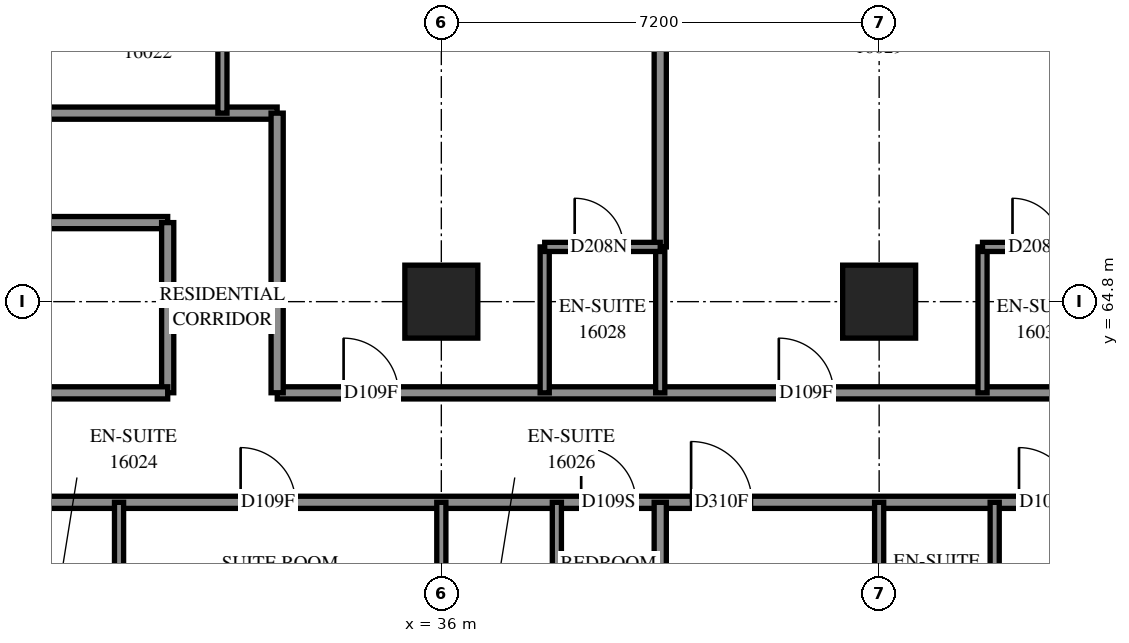
"""IFC4 building model, lengths in metres.
Left out: names, types, materials, properties, quantities, classifications, styles, units other than length and angle.
Written with IfcOpenShell. Run it as: python <this file> out.ifc"""

import sys

from ifc_helpers import new_model, si_unit, direction, frame, frame_2d, origin, origin_2d, place, context, subcontext, project, spatial, rectangle, extrude, element, fill, save


model = new_model("IFC4")
c1 = context("Model", 3, precision=1e-05, world=origin(), true_north=direction((0.0, 1.0)))
c2 = subcontext(c1, "Body", "Model", "MODEL_VIEW")
j1 = project(units=[si_unit("LENGTHUNIT", "METRE"), si_unit("PLANEANGLEUNIT", "RADIAN")], contexts=[c1])
p1 = place(None, origin())
s1 = spatial("IfcSite", under=j1, at=p1, CompositionType="ELEMENT")
p2 = place(p1, origin())
s2 = spatial("IfcBuilding", under=s1, at=p2, CompositionType="ELEMENT")
p3 = place(p2, frame((0.0, 0.0, 61.0)))
s3 = spatial("IfcBuildingStorey", under=s2, at=p3, CompositionType="ELEMENT", Elevation=61.0)
for number, where, z_axis, x_axis in (
    (1, (36.0, 64.8, 0.0), (0.0, 0.0, 1.0), (1.0, 0.0, 0.0)),
    (2, (43.2, 64.8, 0.0), (0.0, 0.0, 1.0), (1.0, 0.0, 0.0)),
):
    element("IfcColumn", number, at=place(p3, frame(where, z_axis=z_axis, x_axis=x_axis)), inside=s3, PredefinedType="COLUMN", context=c2, shape_type="SweptSolid", body=[
        extrude(rectangle(XDim=1.2, YDim=1.2, at=origin_2d()), origin(), (0.0, 0.0, 1.0), 3.1),
    ])
p4 = place(p3, frame((28.8, 61.5, 0.0), z_axis=(0.0, 0.0, 1.0), x_axis=(1.0, 0.0, 0.0)))
e3 = element("IfcWall", 3, at=p4, inside=s3, PredefinedType="PARTITIONING", context=c2, shape_type="SweptSolid", body=[
    extrude(rectangle(XDim=24.3, YDim=0.2, at=frame_2d((12.15, 0.0))), origin(), (0.0, 0.0, 1.0), 3.1),
])
p5 = place(p4, frame((3.899, 0.0, 0.0)))
e4 = element("IfcOpeningElement", 4, at=p5, cuts=e3, PredefinedType="OPENING", context=c2, shape_type="SweptSolid", body=[
    extrude(rectangle(XDim=0.9, YDim=2.1, at=frame_2d((0.45, 1.05))), frame((0.0, 0.11, 0.0), z_axis=(0.0, -1.0, 0.0), x_axis=(1.0, 0.0, 0.0)), (0.0, 0.0, 1.0), 0.22),
])
p6 = place(p4, frame((9.5, 0.0, 0.0)))
e5 = element("IfcOpeningElement", 5, at=p6, cuts=e3, PredefinedType="OPENING", context=c2, shape_type="SweptSolid", body=[
    extrude(rectangle(XDim=0.9, YDim=2.1, at=frame_2d((0.45, 1.05))), frame((0.0, 0.11, 0.0), z_axis=(0.0, -1.0, 0.0), x_axis=(1.0, 0.0, 0.0)), (0.0, 0.0, 1.0), 0.22),
])
p7 = place(p4, frame((11.307, 0.0, 0.0)))
e6 = element("IfcOpeningElement", 6, at=p7, cuts=e3, PredefinedType="OPENING", context=c2, shape_type="SweptSolid", body=[
    extrude(rectangle(XDim=1.0, YDim=2.1, at=frame_2d((0.5, 1.05))), frame((0.0, 0.11, 0.0), z_axis=(0.0, -1.0, 0.0), x_axis=(1.0, 0.0, 0.0)), (0.0, 0.0, 1.0), 0.22),
])
p8 = place(p4, frame((16.7, 0.0, 0.0)))
e7 = element("IfcOpeningElement", 7, at=p8, cuts=e3, PredefinedType="OPENING", context=c2, shape_type="SweptSolid", body=[
    extrude(rectangle(XDim=0.9, YDim=2.1, at=frame_2d((0.45, 1.05))), frame((0.0, 0.11, 0.0), z_axis=(0.0, -1.0, 0.0), x_axis=(1.0, 0.0, 0.0)), (0.0, 0.0, 1.0), 0.22),
])
p9 = place(p4, frame((18.508, 0.0, 0.0)))
e8 = element("IfcOpeningElement", 8, at=p9, cuts=e3, PredefinedType="OPENING", context=c2, shape_type="SweptSolid", body=[
    extrude(rectangle(XDim=1.0, YDim=2.1, at=frame_2d((0.5, 1.05))), frame((0.0, 0.11, 0.0), z_axis=(0.0, -1.0, 0.0), x_axis=(1.0, 0.0, 0.0)), (0.0, 0.0, 1.0), 0.22),
])
p10 = place(p4, frame((23.033, 0.0, 0.0)))
e9 = element("IfcOpeningElement", 9, at=p10, cuts=e3, PredefinedType="OPENING", context=c2, shape_type="SweptSolid", body=[
    extrude(rectangle(XDim=1.0, YDim=2.1, at=frame_2d((0.5, 1.05))), frame((0.0, 0.11, 0.0), z_axis=(0.0, -1.0, 0.0), x_axis=(1.0, 0.0, 0.0)), (0.0, 0.0, 1.0), 0.22),
])
p11 = place(p3, frame((33.302, 63.3, 0.0), z_axis=(0.0, 0.0, 1.0), x_axis=(1.0, 0.0, 0.0)))
e10 = element("IfcWall", 10, at=p11, inside=s3, PredefinedType="PARTITIONING", context=c2, shape_type="SweptSolid", body=[
    extrude(rectangle(XDim=21.798, YDim=0.2, at=frame_2d((10.899, 0.0))), origin(), (0.0, 0.0, 1.0), 3.1),
])
p12 = place(p11, frame((1.091, 0.0, 0.0)))
e11 = element("IfcOpeningElement", 11, at=p12, cuts=e10, PredefinedType="OPENING", context=c2, shape_type="SweptSolid", body=[
    extrude(rectangle(XDim=0.9, YDim=2.1, at=frame_2d((0.45, 1.05))), frame((0.0, 0.11, 0.0), z_axis=(0.0, -1.0, 0.0), x_axis=(1.0, 0.0, 0.0)), (0.0, 0.0, 1.0), 0.22),
])
p13 = place(p11, frame((8.248, 0.0, 0.0)))
e12 = element("IfcOpeningElement", 12, at=p13, cuts=e10, PredefinedType="OPENING", context=c2, shape_type="SweptSolid", body=[
    extrude(rectangle(XDim=0.9, YDim=2.1, at=frame_2d((0.45, 1.05))), frame((0.0, 0.11, 0.0), z_axis=(0.0, -1.0, 0.0), x_axis=(1.0, 0.0, 0.0)), (0.0, 0.0, 1.0), 0.22),
])
p14 = place(p11, frame((15.448, 0.0, 0.0)))
e13 = element("IfcOpeningElement", 13, at=p14, cuts=e10, PredefinedType="OPENING", context=c2, shape_type="SweptSolid", body=[
    extrude(rectangle(XDim=0.9, YDim=2.1, at=frame_2d((0.45, 1.05))), frame((0.0, 0.11, 0.0), z_axis=(0.0, -1.0, 0.0), x_axis=(1.0, 0.0, 0.0)), (0.0, 0.0, 1.0), 0.22),
])
p15 = place(p3, frame((21.602, 67.9, 0.0), z_axis=(0.0, 0.0, 1.0), x_axis=(1.0, 0.0, 0.0)))
e14 = element("IfcWall", 14, at=p15, inside=s3, PredefinedType="PARTITIONING", context=c2, shape_type="SweptSolid", body=[
    extrude(rectangle(XDim=11.698, YDim=0.2, at=frame_2d((5.849, 0.0))), origin(), (0.0, 0.0, 1.0), 3.1),
])
p16 = place(p15, frame((5.955, 0.0, 0.0)))
e15 = element("IfcOpeningElement", 15, at=p16, cuts=e14, PredefinedType="OPENING", context=c2, shape_type="SweptSolid", body=[
    extrude(rectangle(XDim=0.9, YDim=2.1, at=frame_2d((0.45, 1.05))), frame((0.0, 0.11, 0.0), z_axis=(0.0, -1.0, 0.0), x_axis=(1.0, 0.0, 0.0)), (0.0, 0.0, 1.0), 0.22),
])
p17 = place(p3, frame((21.6, 66.1, 0.0), z_axis=(0.0, 0.0, 1.0), x_axis=(1.0, 0.0, 0.0)))
e16 = element("IfcWall", 16, at=p17, inside=s3, PredefinedType="PARTITIONING", context=c2, shape_type="SweptSolid", body=[
    extrude(rectangle(XDim=9.9, YDim=0.2, at=frame_2d((4.95, 0.0))), origin(), (0.0, 0.0, 1.0), 3.1),
])
p18 = place(p17, frame((5.314, 0.0, 0.0)))
e17 = element("IfcOpeningElement", 17, at=p18, cuts=e16, PredefinedType="OPENING", context=c2, shape_type="SweptSolid", body=[
    extrude(rectangle(XDim=1.0, YDim=2.1, at=frame_2d((0.5, 1.05))), frame((0.0, 0.11, 0.0), z_axis=(0.0, -1.0, 0.0), x_axis=(1.0, 0.0, 0.0)), (0.0, 0.0, 1.0), 0.22),
])
p19 = place(p3, frame((39.6, 65.7, 0.0), z_axis=(0.0, 0.0, 1.0), x_axis=(0.0, 1.0, 0.0)))
e18 = element("IfcWall", 18, at=p19, inside=s3, PredefinedType="PARTITIONING", context=c2, shape_type="SweptSolid", body=[
    extrude(rectangle(XDim=7.155, YDim=0.2, at=frame_2d((3.578, 0.0))), origin(), (0.0, 0.0, 1.0), 3.1),
])
p20 = place(p3, frame((39.6, 55.747, 0.0), z_axis=(0.0, 0.0, 1.0), x_axis=(0.0, 1.0, 0.0)))
e19 = element("IfcWall", 19, at=p20, inside=s3, PredefinedType="PARTITIONING", context=c2, shape_type="SweptSolid", body=[
    extrude(rectangle(XDim=5.753, YDim=0.2, at=frame_2d((2.877, 0.0))), origin(), (0.0, 0.0, 1.0), 3.1),
])
p21 = place(p3, frame((33.3, 63.302, 0.0), z_axis=(0.0, 0.0, 1.0), x_axis=(0.0, 1.0, 0.0)))
e20 = element("IfcWall", 20, at=p21, inside=s3, PredefinedType="PARTITIONING", context=c2, shape_type="SweptSolid", body=[
    extrude(rectangle(XDim=4.598, YDim=0.2, at=frame_2d((2.299, 0.0))), origin(), (0.0, 0.0, 1.0), 3.1),
])
p22 = place(p3, frame((31.5, 63.302, 0.0), z_axis=(0.0, 0.0, 1.0), x_axis=(0.0, 1.0, 0.0)))
e21 = element("IfcWall", 21, at=p22, inside=s3, PredefinedType="PARTITIONING", context=c2, shape_type="SweptSolid", body=[
    extrude(rectangle(XDim=2.798, YDim=0.2, at=frame_2d((1.399, 0.0))), origin(), (0.0, 0.0, 1.0), 3.1),
])
p23 = place(p3, frame((28.802, 63.3, 0.0), z_axis=(0.0, 0.0, 1.0), x_axis=(1.0, 0.0, 0.0)))
e22 = element("IfcWall", 22, at=p23, inside=s3, PredefinedType="PARTITIONING", context=c2, shape_type="SweptSolid", body=[
    extrude(rectangle(XDim=2.698, YDim=0.2, at=frame_2d((1.349, 0.0))), origin(), (0.0, 0.0, 1.0), 3.1),
])
for number, where, z_axis, x_axis in (
    (23, (37.7, 63.3, 0.0), (0.0, 0.0, 1.0), (0.0, 1.0, 0.0)),
    (24, (39.6, 63.3, 0.0), (0.0, 0.0, 1.0), (0.0, 1.0, 0.0)),
    (25, (44.9, 63.3, 0.0), (0.0, 0.0, 1.0), (0.0, 1.0, 0.0)),
    (26, (30.7, 59.1, 0.0), (0.0, 0.0, 1.0), (0.0, 1.0, 0.0)),
    (27, (37.9, 59.1, 0.0), (0.0, 0.0, 1.0), (0.0, 1.0, 0.0)),
    (28, (36.0, 59.1, 0.0), (0.0, 0.0, 1.0), (0.0, 1.0, 0.0)),
    (29, (45.1, 59.1, 0.0), (0.0, 0.0, 1.0), (0.0, 1.0, 0.0)),
    (30, (43.2, 59.1, 0.0), (0.0, 0.0, 1.0), (0.0, 1.0, 0.0)),
    (31, (32.4, 67.9, 0.0), (0.0, 0.0, 1.0), (0.0, 1.0, 0.0)),
):
    element("IfcWall", number, at=place(p3, frame(where, z_axis=z_axis, x_axis=x_axis)), inside=s3, PredefinedType="PARTITIONING", context=c2, shape_type="SweptSolid", body=[
        extrude(rectangle(XDim=2.4, YDim=0.15, at=frame_2d((1.2, 0.0))), origin(), (0.0, 0.0, 1.0), 3.1),
    ])
p24 = place(p3, frame((37.7, 65.7, 0.0), z_axis=(0.0, 0.0, 1.0), x_axis=(1.0, 0.0, 0.0)))
e32 = element("IfcWall", 32, at=p24, inside=s3, PredefinedType="PARTITIONING", context=c2, shape_type="SweptSolid", body=[
    extrude(rectangle(XDim=1.9, YDim=0.15, at=frame_2d((0.95, 0.0))), origin(), (0.0, 0.0, 1.0), 3.1),
])
p25 = place(p24, frame((0.493, 0.0, 0.0)))
e33 = element("IfcOpeningElement", 33, at=p25, cuts=e32, PredefinedType="OPENING", context=c2, shape_type="SweptSolid", body=[
    extrude(rectangle(XDim=0.8, YDim=2.1, at=frame_2d((0.4, 1.05))), frame((0.0, 0.085, 0.0), z_axis=(0.0, -1.0, 0.0), x_axis=(1.0, 0.0, 0.0)), (0.0, 0.0, 1.0), 0.17),
])
p26 = place(p3, frame((44.9, 65.7, 0.0), z_axis=(0.0, 0.0, 1.0), x_axis=(1.0, 0.0, 0.0)))
e34 = element("IfcWall", 34, at=p26, inside=s3, PredefinedType="PARTITIONING", context=c2, shape_type="SweptSolid", body=[
    extrude(rectangle(XDim=1.9, YDim=0.15, at=frame_2d((0.95, 0.0))), origin(), (0.0, 0.0, 1.0), 3.1),
])
p27 = place(p26, frame((0.493, 0.0, 0.0)))
e35 = element("IfcOpeningElement", 35, at=p27, cuts=e34, PredefinedType="OPENING", context=c2, shape_type="SweptSolid", body=[
    extrude(rectangle(XDim=0.8, YDim=2.1, at=frame_2d((0.4, 1.05))), frame((0.0, 0.085, 0.0), z_axis=(0.0, -1.0, 0.0), x_axis=(1.0, 0.0, 0.0)), (0.0, 0.0, 1.0), 0.17),
])
p28 = place(p5, origin())
e36 = element("IfcDoor", 36, at=p28, inside=s3, OperationType="SINGLE_SWING_LEFT", PredefinedType="DOOR", context=c2, shape_type="SweptSolid", body=[
    extrude(rectangle(XDim=0.9, YDim=2.1, at=frame_2d((0.45, 1.05))), frame((0.0, 0.025, 0.0), z_axis=(0.0, -1.0, 0.0), x_axis=(1.0, 0.0, 0.0)), (0.0, 0.0, 1.0), 0.05),
])
fill(e4, e36)
p29 = place(p6, origin())
e37 = element("IfcDoor", 37, at=p29, inside=s3, OperationType="SINGLE_SWING_LEFT", PredefinedType="DOOR", context=c2, shape_type="SweptSolid", body=[
    extrude(rectangle(XDim=0.9, YDim=2.1, at=frame_2d((0.45, 1.05))), frame((0.0, 0.025, 0.0), z_axis=(0.0, -1.0, 0.0), x_axis=(1.0, 0.0, 0.0)), (0.0, 0.0, 1.0), 0.05),
])
fill(e5, e37)
p30 = place(p12, origin())
e38 = element("IfcDoor", 38, at=p30, inside=s3, OperationType="SINGLE_SWING_LEFT", PredefinedType="DOOR", context=c2, shape_type="SweptSolid", body=[
    extrude(rectangle(XDim=0.9, YDim=2.1, at=frame_2d((0.45, 1.05))), frame((0.0, 0.025, 0.0), z_axis=(0.0, -1.0, 0.0), x_axis=(1.0, 0.0, 0.0)), (0.0, 0.0, 1.0), 0.05),
])
fill(e11, e38)
p31 = place(p25, origin())
e39 = element("IfcDoor", 39, at=p31, inside=s3, OperationType="SINGLE_SWING_RIGHT", PredefinedType="DOOR", context=c2, shape_type="SweptSolid", body=[
    extrude(rectangle(XDim=0.8, YDim=2.1, at=frame_2d((0.4, 1.05))), frame((0.0, 0.025, 0.0), z_axis=(0.0, -1.0, 0.0), x_axis=(1.0, 0.0, 0.0)), (0.0, 0.0, 1.0), 0.05),
])
fill(e33, e39)
p32 = place(p13, origin())
e40 = element("IfcDoor", 40, at=p32, inside=s3, OperationType="SINGLE_SWING_LEFT", PredefinedType="DOOR", context=c2, shape_type="SweptSolid", body=[
    extrude(rectangle(XDim=0.9, YDim=2.1, at=frame_2d((0.45, 1.05))), frame((0.0, 0.025, 0.0), z_axis=(0.0, -1.0, 0.0), x_axis=(1.0, 0.0, 0.0)), (0.0, 0.0, 1.0), 0.05),
])
fill(e12, e40)
p33 = place(p27, origin())
e41 = element("IfcDoor", 41, at=p33, inside=s3, OperationType="SINGLE_SWING_RIGHT", PredefinedType="DOOR", context=c2, shape_type="SweptSolid", body=[
    extrude(rectangle(XDim=0.8, YDim=2.1, at=frame_2d((0.4, 1.05))), frame((0.0, 0.025, 0.0), z_axis=(0.0, -1.0, 0.0), x_axis=(1.0, 0.0, 0.0)), (0.0, 0.0, 1.0), 0.05),
])
fill(e35, e41)
p34 = place(p7, origin())
e42 = element("IfcDoor", 42, at=p34, inside=s3, OperationType="SINGLE_SWING_RIGHT", PredefinedType="DOOR", context=c2, shape_type="SweptSolid", body=[
    extrude(rectangle(XDim=1.0, YDim=2.1, at=frame_2d((0.5, 1.05))), frame((0.0, 0.025, 0.0), z_axis=(0.0, -1.0, 0.0), x_axis=(1.0, 0.0, 0.0)), (0.0, 0.0, 1.0), 0.05),
])
fill(e6, e42)
p35 = place(p8, origin())
e43 = element("IfcDoor", 43, at=p35, inside=s3, OperationType="SINGLE_SWING_LEFT", PredefinedType="DOOR", context=c2, shape_type="SweptSolid", body=[
    extrude(rectangle(XDim=0.9, YDim=2.1, at=frame_2d((0.45, 1.05))), frame((0.0, 0.025, 0.0), z_axis=(0.0, -1.0, 0.0), x_axis=(1.0, 0.0, 0.0)), (0.0, 0.0, 1.0), 0.05),
])
fill(e7, e43)
save(model, sys.argv[1])
